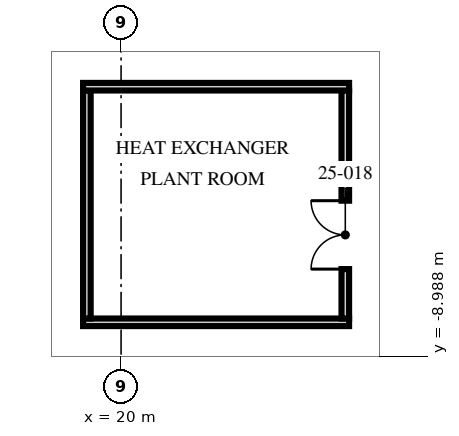
"""IFC4 building model, lengths in metres.
Left out: names, types, materials, properties, quantities, classifications, styles, units other than length and angle.
Written with IfcOpenShell. Run it as: python <this file> out.ifc"""

import sys

from ifc_helpers import new_model, si_unit, direction, frame, frame_2d, origin, origin_2d, place, context, subcontext, project, spatial, rectangle, hollow_rectangle, extrude, element, fill, save


model = new_model("IFC4")
c1 = context("Model", 3, precision=1e-05, world=origin(), true_north=direction((0.0, 1.0)))
c2 = subcontext(c1, "Body", "Model", "MODEL_VIEW")
j1 = project(units=[si_unit("LENGTHUNIT", "METRE"), si_unit("PLANEANGLEUNIT", "RADIAN")], contexts=[c1])
p1 = place(None, origin())
s1 = spatial("IfcSite", under=j1, at=p1, CompositionType="ELEMENT")
p2 = place(p1, origin())
s2 = spatial("IfcBuilding", under=s1, at=p2, CompositionType="ELEMENT")
p3 = place(p2, frame((0.0, 0.0, 99.75)))
s3 = spatial("IfcBuildingStorey", under=s2, at=p3, CompositionType="ELEMENT", Elevation=99.75)
p4 = place(p3, frame((29.8, 0.0, -0.65), z_axis=(-0.334765406017, 0.0, 0.942301503201), x_axis=(0.0, 1.0, 0.0)))
e1 = element("IfcColumn", 1, at=p4, inside=s3, PredefinedType="COLUMN", context=c2, shape_type="SweptSolid", body=[
    extrude(hollow_rectangle(XDim=3.2, YDim=1.8, WallThickness=0.2, at=origin_2d()), origin(), (0.0, 0.0, 1.0), 8.065),
])
p5 = place(p3, frame((29.8, -10.0, -0.65), z_axis=(-0.332963994967, 0.103601510687, 0.937230870724), x_axis=(0.034712905596, 0.994618884766, -0.097612951251)))
e2 = element("IfcColumn", 2, at=p5, inside=s3, PredefinedType="COLUMN", context=c2, shape_type="SweptSolid", body=[
    extrude(hollow_rectangle(XDim=3.2, YDim=1.8, WallThickness=0.2, at=origin_2d()), origin(), (0.0, 0.0, 1.0), 8.109),
])
p6 = place(p3, frame((19.0, -8.1, 0.0), z_axis=(0.0, 0.0, 1.0), x_axis=(1.0, 0.0, 0.0)))
e3 = element("IfcWall", 3, at=p6, inside=s3, PredefinedType="SOLIDWALL", context=c2, shape_type="SweptSolid", body=[
    extrude(rectangle(XDim=7.0, YDim=0.2, at=frame_2d((3.5, 0.0))), origin(), (0.0, 0.0, 1.0), 7.25),
])
p7 = place(p3, frame((19.1, -8.0, 0.0), z_axis=(0.0, 0.0, 1.0), x_axis=(0.0, 1.0, 0.0)))
e4 = element("IfcWall", 4, at=p7, inside=s3, PredefinedType="SOLIDWALL", context=c2, shape_type="SweptSolid", body=[
    extrude(rectangle(XDim=6.0, YDim=0.2, at=frame_2d((3.0, 0.0))), origin(), (0.0, 0.0, 1.0), 6.46),
])
p8 = place(p3, frame((25.9, -8.0, 0.0), z_axis=(0.0, 0.0, 1.0), x_axis=(0.0, 1.0, 0.0)))
e5 = element("IfcWall", 5, at=p8, inside=s3, PredefinedType="SOLIDWALL", context=c2, shape_type="SweptSolid", body=[
    extrude(rectangle(XDim=6.0, YDim=0.2, at=frame_2d((3.0, 0.0))), origin(), (0.0, 0.0, 1.0), 6.46),
])
p9 = place(p8, frame((1.3, 0.0, 0.0)))
e6 = element("IfcOpeningElement", 6, at=p9, cuts=e5, PredefinedType="OPENING", context=c2, shape_type="SweptSolid", body=[
    extrude(rectangle(XDim=1.8, YDim=2.4, at=frame_2d((0.9, 1.2))), frame((0.0, 0.11, 0.0), z_axis=(0.0, -1.0, 0.0), x_axis=(1.0, 0.0, 0.0)), (0.0, 0.0, 1.0), 0.22),
])
p10 = place(p3, frame((19.0, -1.9, 0.0), z_axis=(0.0, 0.0, 1.0), x_axis=(1.0, 0.0, 0.0)))
e7 = element("IfcWall", 7, at=p10, inside=s3, PredefinedType="SOLIDWALL", context=c2, shape_type="SweptSolid", body=[
    extrude(rectangle(XDim=7.0, YDim=0.2, at=frame_2d((3.5, 0.0))), origin(), (0.0, 0.0, 1.0), 7.25),
])
p11 = place(p9, origin())
e8 = element("IfcDoor", 8, at=p11, inside=s3, OperationType="DOUBLE_DOOR_SINGLE_SWING", PredefinedType="DOOR", context=c2, shape_type="SweptSolid", body=[
    extrude(rectangle(XDim=1.8, YDim=2.4, at=frame_2d((0.9, 1.2))), frame((0.0, 0.025, 0.0), z_axis=(0.0, -1.0, 0.0), x_axis=(1.0, 0.0, 0.0)), (0.0, 0.0, 1.0), 0.05),
])
fill(e6, e8)
save(model, sys.argv[1])
